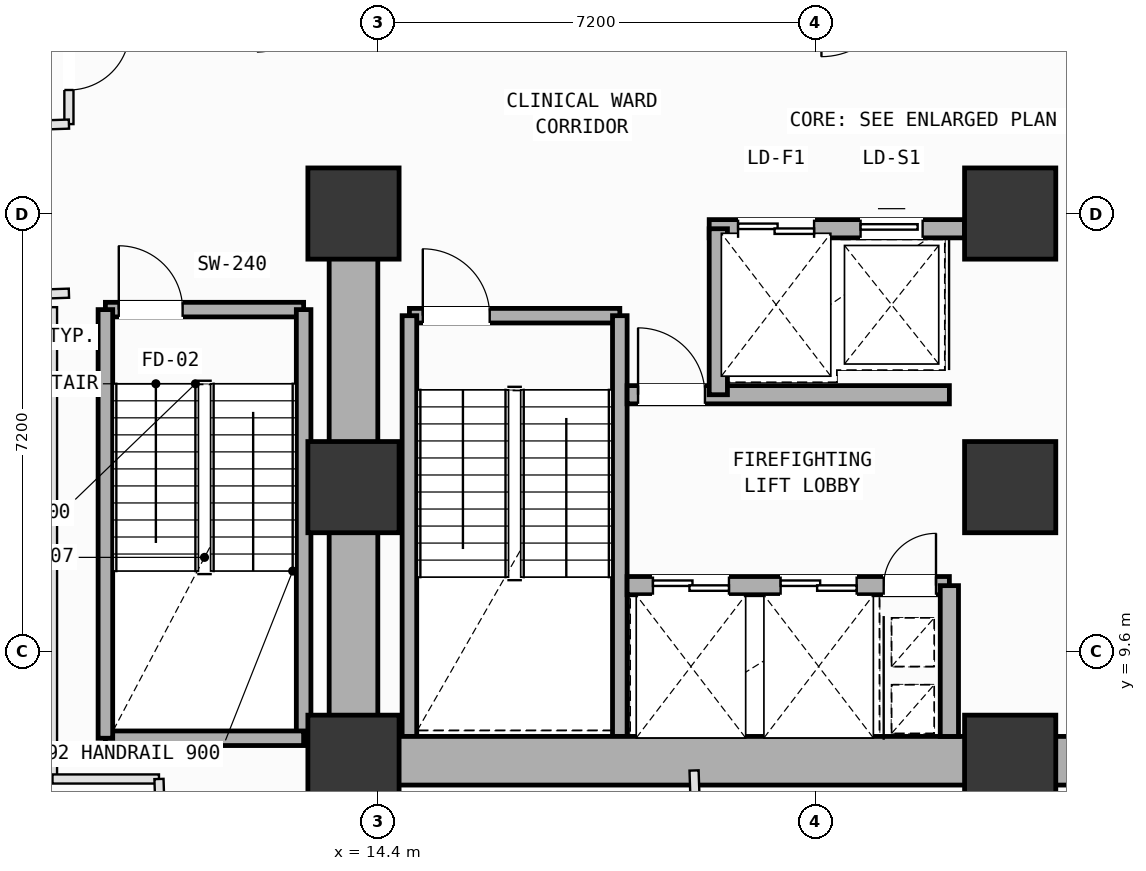
"""IFC4 building model, lengths in metres.
Left out: names, types, materials, properties, quantities, classifications, styles, units other than length and angle.
Written with IfcOpenShell. Run it as: python <this file> out.ifc"""

import sys

from ifc_helpers import new_model, si_unit, direction, frame, frame_2d, origin, origin_2d, place, context, subcontext, project, spatial, rectangle, extrude, element, fill, save


model = new_model("IFC4")
c1 = context("Model", 3, precision=1e-05, world=origin(), true_north=direction((0.0, 1.0)))
c2 = subcontext(c1, "Body", "Model", "MODEL_VIEW")
j1 = project(units=[si_unit("LENGTHUNIT", "METRE"), si_unit("PLANEANGLEUNIT", "RADIAN")], contexts=[c1])
p1 = place(None, origin())
s1 = spatial("IfcSite", under=j1, at=p1, CompositionType="ELEMENT")
p2 = place(p1, origin())
s2 = spatial("IfcBuilding", under=s1, at=p2, CompositionType="ELEMENT")
p3 = place(p2, frame((0.0, 0.0, 31.0)))
s3 = spatial("IfcBuildingStorey", under=s2, at=p3, CompositionType="ELEMENT", Elevation=31.0)
for number, where, z_axis, x_axis in (
    (1, (14.0, 7.8, 0.0), (0.0, 0.0, 1.0), (1.0, 0.0, 0.0)),
    (2, (14.0, 12.3, 0.0), (0.0, 0.0, 1.0), (1.0, 0.0, 0.0)),
    (3, (14.0, 16.8, 0.0), (0.0, 0.0, 1.0), (1.0, 0.0, 0.0)),
    (4, (24.8, 7.8, 0.0), (0.0, 0.0, 1.0), (1.0, 0.0, 0.0)),
    (5, (24.8, 12.3, 0.0), (0.0, 0.0, 1.0), (1.0, 0.0, 0.0)),
    (6, (24.8, 16.8, 0.0), (0.0, 0.0, 1.0), (1.0, 0.0, 0.0)),
):
    element("IfcColumn", number, at=place(p3, frame(where, z_axis=z_axis, x_axis=x_axis)), inside=s3, PredefinedType="COLUMN", context=c2, shape_type="SweptSolid", body=[
        extrude(rectangle(XDim=1.5, YDim=1.5, at=origin_2d()), origin(), (0.0, 0.0, 1.0), 4.0),
    ])
p4 = place(p3, frame((14.92, 15.12, 0.0), z_axis=(0.0, 0.0, 1.0), x_axis=(1.0, 0.0, 0.0)))
e7 = element("IfcWall", 7, at=p4, inside=s3, PredefinedType="SOLIDWALL", context=c2, shape_type="SweptSolid", body=[
    extrude(rectangle(XDim=3.46, YDim=0.24, at=frame_2d((1.73, 0.0))), origin(), (0.0, 0.0, 1.0), 3.78),
])
p5 = place(p4, frame((0.22, 0.0, 0.0)))
e8 = element("IfcOpeningElement", 8, at=p5, cuts=e7, PredefinedType="OPENING", context=c2, shape_type="SweptSolid", body=[
    extrude(rectangle(XDim=1.1, YDim=2.15, at=frame_2d((0.55, 1.075))), frame((0.0, 0.13, 0.0), z_axis=(0.0, -1.0, 0.0), x_axis=(1.0, 0.0, 0.0)), (0.0, 0.0, 1.0), 0.26),
])
for number, where, z_axis, x_axis in (
    (9, (18.38, 15.12, 0.0), (0.0, 0.0, 1.0), (0.0, -1.0, 0.0)),
    (10, (14.92, 8.2, 0.0), (0.0, 0.0, 1.0), (0.0, 1.0, 0.0)),
):
    element("IfcWall", number, at=place(p3, frame(where, z_axis=z_axis, x_axis=x_axis)), inside=s3, PredefinedType="SOLIDWALL", context=c2, shape_type="SweptSolid", body=[
        extrude(rectangle(XDim=6.92, YDim=0.24, at=frame_2d((3.46, 0.0))), origin(), (0.0, 0.0, 1.0), 3.78),
    ])
p6 = place(p3, frame((9.92, 15.22, 0.0), z_axis=(0.0, 0.0, 1.0), x_axis=(1.0, 0.0, 0.0)))
e11 = element("IfcWall", 11, at=p6, inside=s3, PredefinedType="SOLIDWALL", context=c2, shape_type="SweptSolid", body=[
    extrude(rectangle(XDim=3.26, YDim=0.24, at=frame_2d((1.63, 0.0))), origin(), (0.0, 0.0, 1.0), 3.78),
])
p7 = place(p6, frame((0.22, 0.0, 0.0)))
e12 = element("IfcOpeningElement", 12, at=p7, cuts=e11, PredefinedType="OPENING", context=c2, shape_type="SweptSolid", body=[
    extrude(rectangle(XDim=1.05, YDim=2.15, at=frame_2d((0.525, 1.075))), frame((0.0, 0.13, 0.0), z_axis=(0.0, -1.0, 0.0), x_axis=(1.0, 0.0, 0.0)), (0.0, 0.0, 1.0), 0.26),
])
p8 = place(p3, frame((13.18, 15.22, 0.0), z_axis=(0.0, 0.0, 1.0), x_axis=(0.0, -1.0, 0.0)))
e13 = element("IfcWall", 13, at=p8, inside=s3, PredefinedType="SOLIDWALL", context=c2, shape_type="SweptSolid", body=[
    extrude(rectangle(XDim=7.05, YDim=0.24, at=frame_2d((3.525, 0.0))), origin(), (0.0, 0.0, 1.0), 3.78),
])
p9 = place(p3, frame((13.18, 8.17, 0.0), z_axis=(0.0, 0.0, 1.0), x_axis=(-1.0, 0.0, 0.0)))
e14 = element("IfcWall", 14, at=p9, inside=s3, PredefinedType="SOLIDWALL", context=c2, shape_type="SweptSolid", body=[
    extrude(rectangle(XDim=3.26, YDim=0.24, at=frame_2d((1.63, 0.0))), origin(), (0.0, 0.0, 1.0), 3.78),
])
p10 = place(p3, frame((9.92, 8.17, 0.0), z_axis=(0.0, 0.0, 1.0), x_axis=(0.0, 1.0, 0.0)))
e15 = element("IfcWall", 15, at=p10, inside=s3, PredefinedType="SOLIDWALL", context=c2, shape_type="SweptSolid", body=[
    extrude(rectangle(XDim=7.05, YDim=0.24, at=frame_2d((3.525, 0.0))), origin(), (0.0, 0.0, 1.0), 3.78),
])
for number, where, z_axis, x_axis in (
    (16, (14.0, 7.8, 0.0), (0.0, 0.0, 1.0), (1.0, 0.0, 0.0)),
    (17, (24.8, 7.8, 0.0), (0.0, 0.0, 1.0), (1.0, 0.0, 0.0)),
):
    element("IfcWall", number, at=place(p3, frame(where, z_axis=z_axis, x_axis=x_axis)), inside=s3, PredefinedType="SHEAR", context=c2, shape_type="SweptSolid", body=[
        extrude(rectangle(XDim=10.8, YDim=0.8, at=frame_2d((5.4, 0.0))), origin(), (0.0, 0.0, 1.0), 3.78),
    ])
p11 = place(p3, frame((14.0, 16.8, 0.0), z_axis=(0.0, 0.0, 1.0), x_axis=(0.0, -1.0, 0.0)))
e18 = element("IfcWall", 18, at=p11, inside=s3, PredefinedType="SHEAR", context=c2, shape_type="SweptSolid", body=[
    extrude(rectangle(XDim=9.0, YDim=0.8, at=frame_2d((4.5, 0.0))), origin(), (0.0, 0.0, 1.0), 3.78),
])
p12 = place(p3, frame((19.85, 16.55, 0.0), z_axis=(0.0, 0.0, 1.0), x_axis=(1.0, 0.0, 0.0)))
e19 = element("IfcWall", 19, at=p12, inside=s3, PredefinedType="SOLIDWALL", context=c2, shape_type="SweptSolid", body=[
    extrude(rectangle(XDim=4.2, YDim=0.3, at=frame_2d((2.1, 0.0))), origin(), (0.0, 0.0, 1.0), 3.78),
])
p13 = place(p12, frame((0.475, 0.0, 0.0)))
e20 = element("IfcOpeningElement", 20, at=p13, cuts=e19, PredefinedType="OPENING", context=c2, shape_type="SweptSolid", body=[
    extrude(rectangle(XDim=1.25, YDim=2.18, at=frame_2d((0.625, 1.09))), frame((0.0, 0.16, 0.0), z_axis=(0.0, -1.0, 0.0), x_axis=(1.0, 0.0, 0.0)), (0.0, 0.0, 1.0), 0.32),
])
p14 = place(p12, frame((2.49, 0.0, 0.0)))
e21 = element("IfcOpeningElement", 21, at=p14, cuts=e19, PredefinedType="OPENING", context=c2, shape_type="SweptSolid", body=[
    extrude(rectangle(XDim=1.02, YDim=2.12, at=frame_2d((0.51, 1.06))), frame((0.0, 0.16, 0.0), z_axis=(0.0, -1.0, 0.0), x_axis=(1.0, 0.0, 0.0)), (0.0, 0.0, 1.0), 0.32),
])
p15 = place(p3, frame((18.5, 10.68, 0.0), z_axis=(0.0, 0.0, 1.0), x_axis=(1.0, 0.0, 0.0)))
e22 = element("IfcWall", 22, at=p15, inside=s3, PredefinedType="SOLIDWALL", context=c2, shape_type="SweptSolid", body=[
    extrude(rectangle(XDim=5.3, YDim=0.3, at=frame_2d((2.65, 0.0))), origin(), (0.0, 0.0, 1.0), 3.78),
])
p16 = place(p15, frame((4.22, 0.0, 0.0)))
e23 = element("IfcOpeningElement", 23, at=p16, cuts=e22, PredefinedType="OPENING", context=c2, shape_type="SweptSolid", body=[
    extrude(rectangle(XDim=0.86, YDim=2.06, at=frame_2d((0.43, 1.03))), frame((0.0, 0.16, 0.0), z_axis=(0.0, -1.0, 0.0), x_axis=(1.0, 0.0, 0.0)), (0.0, 0.0, 1.0), 0.32),
])
p17 = place(p15, frame((0.425, 0.0, 0.0)))
e24 = element("IfcOpeningElement", 24, at=p17, cuts=e22, PredefinedType="OPENING", context=c2, shape_type="SweptSolid", body=[
    extrude(rectangle(XDim=1.25, YDim=2.18, at=frame_2d((0.625, 1.09))), frame((0.0, 0.16, 0.0), z_axis=(0.0, -1.0, 0.0), x_axis=(1.0, 0.0, 0.0)), (0.0, 0.0, 1.0), 0.32),
])
p18 = place(p15, frame((2.525, 0.0, 0.0)))
e25 = element("IfcOpeningElement", 25, at=p18, cuts=e22, PredefinedType="OPENING", context=c2, shape_type="SweptSolid", body=[
    extrude(rectangle(XDim=1.25, YDim=2.18, at=frame_2d((0.625, 1.09))), frame((0.0, 0.16, 0.0), z_axis=(0.0, -1.0, 0.0), x_axis=(1.0, 0.0, 0.0)), (0.0, 0.0, 1.0), 0.32),
])
p19 = place(p3, frame((18.5, 13.82, 0.0), z_axis=(0.0, 0.0, 1.0), x_axis=(1.0, 0.0, 0.0)))
e26 = element("IfcWall", 26, at=p19, inside=s3, PredefinedType="SOLIDWALL", context=c2, shape_type="SweptSolid", body=[
    extrude(rectangle(XDim=5.3, YDim=0.3, at=frame_2d((2.65, 0.0))), origin(), (0.0, 0.0, 1.0), 3.78),
])
p20 = place(p19, frame((0.18, 0.0, 0.0)))
e27 = element("IfcOpeningElement", 27, at=p20, cuts=e26, PredefinedType="OPENING", context=c2, shape_type="SweptSolid", body=[
    extrude(rectangle(XDim=1.1, YDim=2.15, at=frame_2d((0.55, 1.075))), frame((0.0, 0.16, 0.0), z_axis=(0.0, -1.0, 0.0), x_axis=(1.0, 0.0, 0.0)), (0.0, 0.0, 1.0), 0.32),
])
p21 = place(p3, frame((23.8, 8.2, 0.0), z_axis=(0.0, 0.0, 1.0), x_axis=(0.0, 1.0, 0.0)))
e28 = element("IfcWall", 28, at=p21, inside=s3, PredefinedType="SOLIDWALL", context=c2, shape_type="SweptSolid", body=[
    extrude(rectangle(XDim=2.48, YDim=0.3, at=frame_2d((1.24, 0.0))), origin(), (0.0, 0.0, 1.0), 3.78),
])
p22 = place(p3, frame((20.0, 13.82, 0.0), z_axis=(0.0, 0.0, 1.0), x_axis=(0.0, 1.0, 0.0)))
e29 = element("IfcWall", 29, at=p22, inside=s3, PredefinedType="SOLIDWALL", context=c2, shape_type="SweptSolid", body=[
    extrude(rectangle(XDim=2.73, YDim=0.3, at=frame_2d((1.365, 0.0))), origin(), (0.0, 0.0, 1.0), 3.78),
])
p23 = place(p3, frame((6.582, 15.399, 0.0), z_axis=(0.0, 0.0, 1.0), x_axis=(0.999447376951, 0.033240648382, 0.0)))
e30 = element("IfcWall", 30, at=p23, inside=s3, PredefinedType="PARTITIONING", context=c2, shape_type="SweptSolid", body=[
    extrude(rectangle(XDim=2.74, YDim=0.15, at=frame_2d((1.37, 0.0))), origin(), (0.0, 0.0, 1.0), 3.78),
])
p24 = place(p23, frame((1.533, 0.0, 0.0)))
e31 = element("IfcOpeningElement", 31, at=p24, cuts=e30, PredefinedType="OPENING", context=c2, shape_type="SweptSolid", body=[
    extrude(rectangle(XDim=0.86, YDim=2.06, at=frame_2d((0.43, 1.03))), frame((0.0, 0.085, 0.0), z_axis=(0.0, -1.0, 0.0), x_axis=(1.0, 0.0, 0.0)), (0.0, 0.0, 1.0), 0.17),
])
p25 = place(p3, frame((9.05, 15.26, 0.0), z_axis=(0.0, 0.0, 1.0), x_axis=(0.0, -1.0, 0.0)))
e32 = element("IfcWall", 32, at=p25, inside=s3, PredefinedType="PARTITIONING", context=c2, shape_type="SweptSolid", body=[
    extrude(rectangle(XDim=7.76, YDim=0.15, at=frame_2d((3.88, 0.0))), origin(), (0.0, 0.0, 1.0), 3.78),
])
p26 = place(p3, frame((9.05, 7.5, 0.0), z_axis=(0.0, 0.0, 1.0), x_axis=(1.0, 0.0, 0.0)))
e33 = element("IfcWall", 33, at=p26, inside=s3, PredefinedType="PARTITIONING", context=c2, shape_type="SweptSolid", body=[
    extrude(rectangle(XDim=1.751, YDim=0.15, at=frame_2d((0.875, 0.0))), origin(), (0.0, 0.0, 1.0), 3.78),
])
p27 = place(p3, frame((10.801, 7.5, 0.0), z_axis=(0.0, 0.0, 1.0), x_axis=(0.03316477793, -0.999449897446, 0.0)))
e34 = element("IfcWall", 34, at=p27, inside=s3, PredefinedType="PARTITIONING", context=c2, shape_type="SweptSolid", body=[
    extrude(rectangle(XDim=5.58, YDim=0.15, at=frame_2d((2.79, 0.0))), origin(), (0.0, 0.0, 1.0), 3.78),
])
p28 = place(p3, frame((19.601, 7.64, 0.0), z_axis=(0.0, 0.0, 1.0), x_axis=(0.033144127038, -0.999450582492, 0.0)))
e35 = element("IfcWall", 35, at=p28, inside=s3, PredefinedType="PARTITIONING", context=c2, shape_type="SweptSolid", body=[
    extrude(rectangle(XDim=5.429, YDim=0.15, at=frame_2d((2.714, 0.0))), origin(), (0.0, 0.0, 1.0), 3.78),
])
p29 = place(p3, frame((9.32, 20.393, 0.0), z_axis=(0.0, 0.0, 1.0), x_axis=(0.0, -1.0, 0.0)))
e36 = element("IfcWall", 36, at=p29, inside=s3, PredefinedType="PARTITIONING", context=c2, shape_type="SweptSolid", body=[
    extrude(rectangle(XDim=2.122, YDim=0.15, at=frame_2d((1.061, 0.0))), origin(), (0.0, 0.0, 1.0), 3.78),
])
p30 = place(p29, frame((0.561, 0.0, 0.0)))
e37 = element("IfcOpeningElement", 37, at=p30, cuts=e36, PredefinedType="OPENING", context=c2, shape_type="SweptSolid", body=[
    extrude(rectangle(XDim=1.0, YDim=2.12, at=frame_2d((0.5, 1.06))), frame((0.0, 0.085, 0.0), z_axis=(0.0, -1.0, 0.0), x_axis=(1.0, 0.0, 0.0)), (0.0, 0.0, 1.0), 0.17),
])
p31 = place(p3, frame((9.32, 18.271, 0.0), z_axis=(0.0, 0.0, 1.0), x_axis=(-0.999445522723, -0.033296352784, 0.0)))
e38 = element("IfcWall", 38, at=p31, inside=s3, PredefinedType="PARTITIONING", context=c2, shape_type="SweptSolid", body=[
    extrude(rectangle(XDim=1.32, YDim=0.15, at=frame_2d((0.66, 0.0))), origin(), (0.0, 0.0, 1.0), 3.78),
])
p32 = place(p5, origin())
e39 = element("IfcDoor", 39, at=p32, inside=s3, OperationType="SINGLE_SWING_LEFT", PredefinedType="DOOR", context=c2, shape_type="SweptSolid", body=[
    extrude(rectangle(XDim=1.1, YDim=2.15, at=frame_2d((0.55, 1.075))), frame((0.0, 0.025, 0.0), z_axis=(0.0, -1.0, 0.0), x_axis=(1.0, 0.0, 0.0)), (0.0, 0.0, 1.0), 0.05),
])
fill(e8, e39)
p33 = place(p7, origin())
e40 = element("IfcDoor", 40, at=p33, inside=s3, OperationType="SINGLE_SWING_LEFT", PredefinedType="DOOR", context=c2, shape_type="SweptSolid", body=[
    extrude(rectangle(XDim=1.05, YDim=2.15, at=frame_2d((0.525, 1.075))), frame((0.0, 0.025, 0.0), z_axis=(0.0, -1.0, 0.0), x_axis=(1.0, 0.0, 0.0)), (0.0, 0.0, 1.0), 0.05),
])
fill(e12, e40)
p34 = place(p16, origin())
e41 = element("IfcDoor", 41, at=p34, inside=s3, OperationType="SINGLE_SWING_RIGHT", PredefinedType="DOOR", context=c2, shape_type="SweptSolid", body=[
    extrude(rectangle(XDim=0.86, YDim=2.06, at=frame_2d((0.43, 1.03))), frame((0.0, 0.025, 0.0), z_axis=(0.0, -1.0, 0.0), x_axis=(1.0, 0.0, 0.0)), (0.0, 0.0, 1.0), 0.05),
])
fill(e23, e41)
p35 = place(p20, origin())
e42 = element("IfcDoor", 42, at=p35, inside=s3, OperationType="SINGLE_SWING_LEFT", PredefinedType="DOOR", context=c2, shape_type="SweptSolid", body=[
    extrude(rectangle(XDim=1.1, YDim=2.15, at=frame_2d((0.55, 1.075))), frame((0.0, 0.025, 0.0), z_axis=(0.0, -1.0, 0.0), x_axis=(1.0, 0.0, 0.0)), (0.0, 0.0, 1.0), 0.05),
])
fill(e27, e42)
p36 = place(p17, origin())
e43 = element("IfcDoor", 43, at=p36, inside=s3, OperationType="DOUBLE_DOOR_SLIDING", PredefinedType="DOOR", context=c2, shape_type="SweptSolid", body=[
    extrude(rectangle(XDim=1.25, YDim=2.18, at=frame_2d((0.625, 1.09))), frame((0.0, 0.025, 0.0), z_axis=(0.0, -1.0, 0.0), x_axis=(1.0, 0.0, 0.0)), (0.0, 0.0, 1.0), 0.05),
])
fill(e24, e43)
p37 = place(p18, origin())
e44 = element("IfcDoor", 44, at=p37, inside=s3, OperationType="DOUBLE_DOOR_SLIDING", PredefinedType="DOOR", context=c2, shape_type="SweptSolid", body=[
    extrude(rectangle(XDim=1.25, YDim=2.18, at=frame_2d((0.625, 1.09))), frame((0.0, 0.025, 0.0), z_axis=(0.0, -1.0, 0.0), x_axis=(1.0, 0.0, 0.0)), (0.0, 0.0, 1.0), 0.05),
])
fill(e25, e44)
p38 = place(p13, origin())
e45 = element("IfcDoor", 45, at=p38, inside=s3, OperationType="DOUBLE_DOOR_SLIDING", PredefinedType="DOOR", context=c2, shape_type="SweptSolid", body=[
    extrude(rectangle(XDim=1.25, YDim=2.18, at=frame_2d((0.625, 1.09))), frame((0.0, 0.025, 0.0), z_axis=(0.0, -1.0, 0.0), x_axis=(1.0, 0.0, 0.0)), (0.0, 0.0, 1.0), 0.05),
])
fill(e20, e45)
p39 = place(p14, origin())
e46 = element("IfcDoor", 46, at=p39, inside=s3, OperationType="SLIDING_TO_LEFT", PredefinedType="DOOR", context=c2, shape_type="SweptSolid", body=[
    extrude(rectangle(XDim=1.02, YDim=2.12, at=frame_2d((0.51, 1.06))), frame((0.0, 0.025, 0.0), z_axis=(0.0, -1.0, 0.0), x_axis=(1.0, 0.0, 0.0)), (0.0, 0.0, 1.0), 0.05),
])
fill(e21, e46)
p40 = place(p30, origin())
e47 = element("IfcDoor", 47, at=p40, inside=s3, OperationType="SINGLE_SWING_LEFT", PredefinedType="DOOR", context=c2, shape_type="SweptSolid", body=[
    extrude(rectangle(XDim=1.0, YDim=2.12, at=frame_2d((0.5, 1.06))), frame((0.0, 0.025, 0.0), z_axis=(0.0, -1.0, 0.0), x_axis=(1.0, 0.0, 0.0)), (0.0, 0.0, 1.0), 0.05),
])
fill(e37, e47)
save(model, sys.argv[1])
